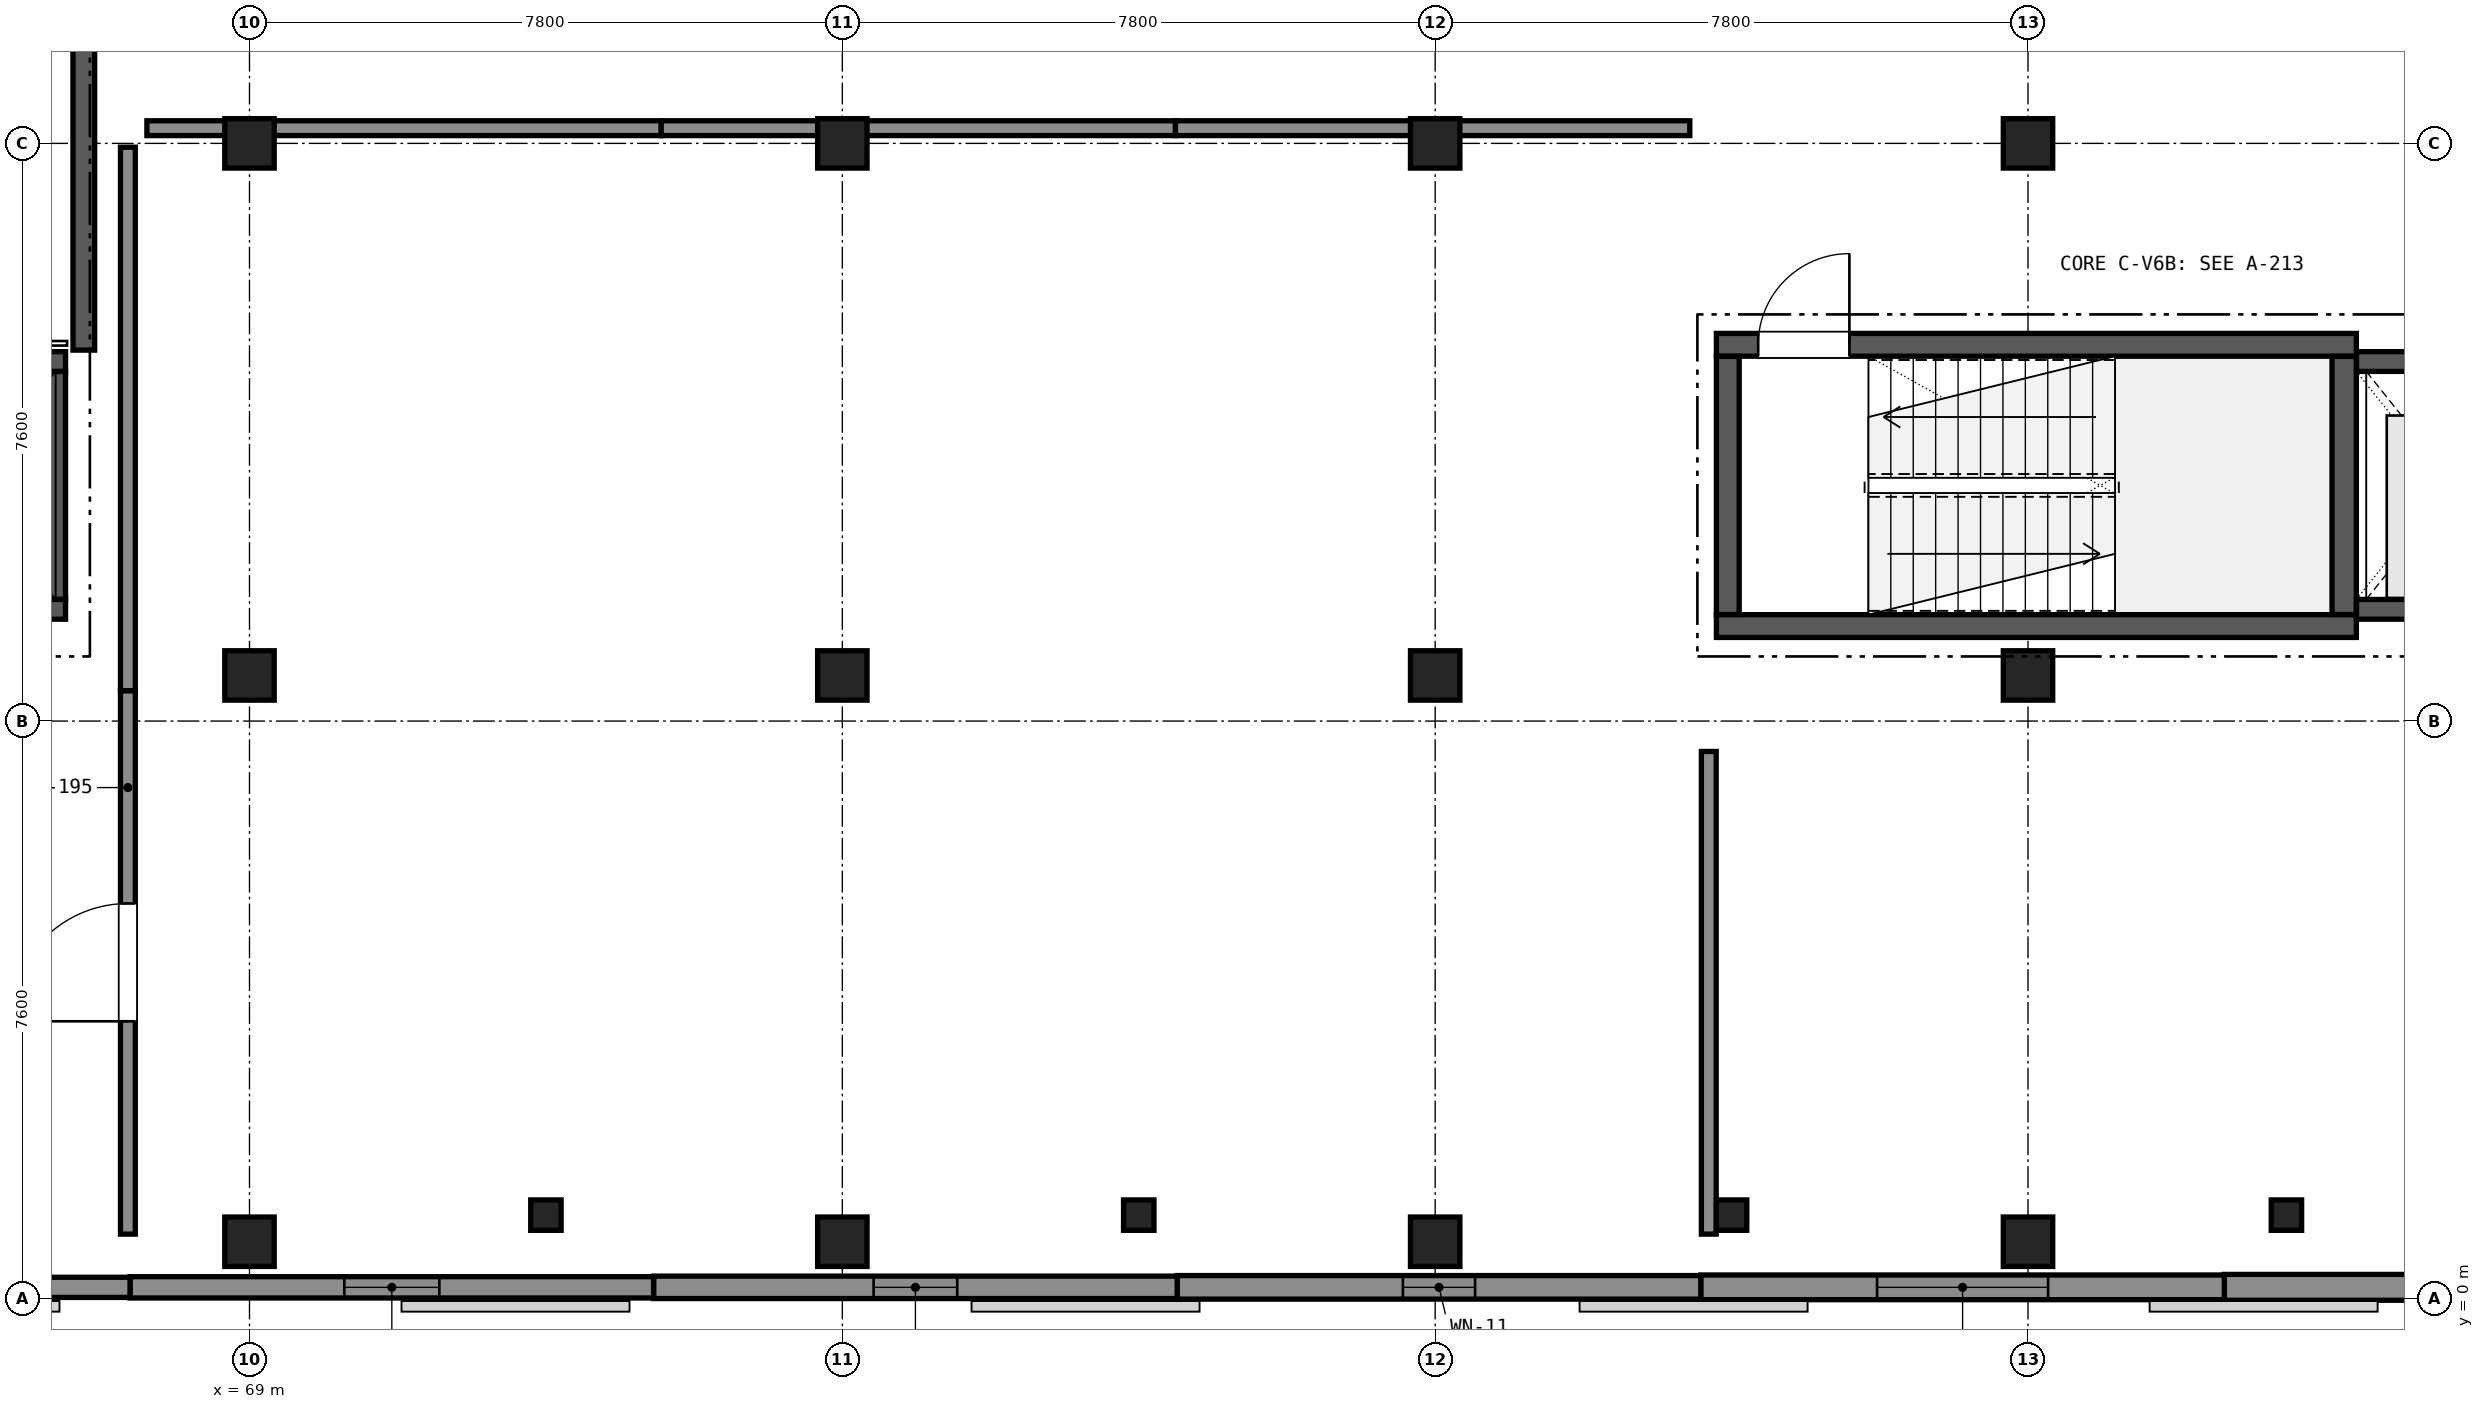
"""IFC4 building model, lengths in metres.
Left out: names, types, materials, properties, quantities, classifications, styles, units other than length and angle.
Written with IfcOpenShell. Run it as: python <this file> out.ifc"""

import sys

from ifc_helpers import new_model, si_unit, direction, frame, frame_2d, origin, origin_2d, place, context, subcontext, project, spatial, rectangle, extrude, element, fill, save


model = new_model("IFC4")
c1 = context("Model", 3, precision=1e-05, world=origin(), true_north=direction((0.0, 1.0)))
c2 = subcontext(c1, "Body", "Model", "MODEL_VIEW")
j1 = project(units=[si_unit("LENGTHUNIT", "METRE"), si_unit("PLANEANGLEUNIT", "RADIAN")], contexts=[c1])
p1 = place(None, origin())
s1 = spatial("IfcSite", under=j1, at=p1, CompositionType="ELEMENT")
p2 = place(p1, origin())
s2 = spatial("IfcBuilding", under=s1, at=p2, CompositionType="ELEMENT")
p3 = place(p2, frame((0.0, 0.0, 9.52)))
s3 = spatial("IfcBuildingStorey", under=s2, at=p3, CompositionType="ELEMENT", Elevation=9.52)
for number, where, z_axis, x_axis in (
    (1, (69.0, 0.75, 0.0), (0.0, 0.0, 1.0), (1.0, 0.0, 0.0)),
    (2, (69.0, 8.2, 0.0), (0.0, 0.0, 1.0), (1.0, 0.0, 0.0)),
    (3, (69.0, 15.2, 0.0), (0.0, 0.0, 1.0), (1.0, 0.0, 0.0)),
    (4, (76.8, 0.75, 0.0), (0.0, 0.0, 1.0), (1.0, 0.0, 0.0)),
    (5, (76.8, 8.2, 0.0), (0.0, 0.0, 1.0), (1.0, 0.0, 0.0)),
    (6, (76.8, 15.2, 0.0), (0.0, 0.0, 1.0), (1.0, 0.0, 0.0)),
    (7, (84.6, 0.75, 0.0), (0.0, 0.0, 1.0), (1.0, 0.0, 0.0)),
    (8, (84.6, 8.2, 0.0), (0.0, 0.0, 1.0), (1.0, 0.0, 0.0)),
    (9, (84.6, 15.2, 0.0), (0.0, 0.0, 1.0), (1.0, 0.0, 0.0)),
    (10, (92.4, 0.75, 0.0), (0.0, 0.0, 1.0), (1.0, 0.0, 0.0)),
    (11, (92.4, 8.2, 0.0), (0.0, 0.0, 1.0), (1.0, 0.0, 0.0)),
    (12, (92.4, 15.2, 0.0), (0.0, 0.0, 1.0), (1.0, 0.0, 0.0)),
):
    element("IfcColumn", number, at=place(p3, frame(where, z_axis=z_axis, x_axis=x_axis)), inside=s3, PredefinedType="COLUMN", context=c2, shape_type="SweptSolid", body=[
        extrude(rectangle(XDim=0.65, YDim=0.65, at=origin_2d()), origin(), (0.0, 0.0, 1.0), 4.08),
    ])
for number, where, z_axis, x_axis in (
    (13, (72.9, 1.1, 0.0), (0.0, 0.0, 1.0), (1.0, 0.0, 0.0)),
    (14, (80.7, 1.1, 0.0), (0.0, 0.0, 1.0), (1.0, 0.0, 0.0)),
    (15, (88.5, 1.1, 0.0), (0.0, 0.0, 1.0), (1.0, 0.0, 0.0)),
    (16, (95.8, 1.1, 0.0), (0.0, 0.0, 1.0), (1.0, 0.0, 0.0)),
):
    element("IfcColumn", number, at=place(p3, frame(where, z_axis=z_axis, x_axis=x_axis)), inside=s3, PredefinedType="PILASTER", context=c2, shape_type="SweptSolid", body=[
        extrude(rectangle(XDim=0.4, YDim=0.4, at=origin_2d()), origin(), (0.0, 0.0, 1.0), 4.08),
    ])
p4 = place(p3, frame((101.872, 0.15, 0.0), z_axis=(0.0, 0.0, 1.0), x_axis=(-1.0, 0.0, 0.0)))
e17 = element("IfcWall", 17, at=p4, inside=s3, PredefinedType="SOLIDWALL", context=c2, shape_type="SweptSolid", body=[
    extrude(rectangle(XDim=6.889, YDim=0.34, at=frame_2d((3.444, 0.0))), origin(), (0.0, 0.0, 1.0), 3.78),
])
p5 = place(p4, frame((2.394, 0.0, 0.9)))
e18 = element("IfcOpeningElement", 18, at=p5, cuts=e17, PredefinedType="OPENING", context=c2, shape_type="SweptSolid", body=[
    extrude(rectangle(XDim=2.1, YDim=1.5, at=frame_2d((1.05, 0.75))), frame((0.0, 0.18, 0.0), z_axis=(0.0, -1.0, 0.0), x_axis=(1.0, 0.0, 0.0)), (0.0, 0.0, 1.0), 0.36),
])
p6 = place(p3, frame((94.983, 0.15, 0.0), z_axis=(0.0, 0.0, 1.0), x_axis=(-1.0, 0.0, 0.0)))
e19 = element("IfcWall", 19, at=p6, inside=s3, PredefinedType="SOLIDWALL", context=c2, shape_type="SweptSolid", body=[
    extrude(rectangle(XDim=6.889, YDim=0.325, at=frame_2d((3.444, 0.0))), origin(), (0.0, 0.0, 1.0), 3.78),
])
p7 = place(p6, frame((2.319, 0.0, 0.9)))
e20 = element("IfcOpeningElement", 20, at=p7, cuts=e19, PredefinedType="OPENING", context=c2, shape_type="SweptSolid", body=[
    extrude(rectangle(XDim=2.25, YDim=1.5, at=frame_2d((1.125, 0.75))), frame((0.0, 0.172, 0.0), z_axis=(0.0, -1.0, 0.0), x_axis=(1.0, 0.0, 0.0)), (0.0, 0.0, 1.0), 0.345),
])
p8 = place(p3, frame((88.094, 0.15, 0.0), z_axis=(0.0, 0.0, 1.0), x_axis=(-1.0, 0.0, 0.0)))
e21 = element("IfcWall", 21, at=p8, inside=s3, PredefinedType="SOLIDWALL", context=c2, shape_type="SweptSolid", body=[
    extrude(rectangle(XDim=6.889, YDim=0.31, at=frame_2d((3.444, 0.0))), origin(), (0.0, 0.0, 1.0), 3.78),
])
p9 = place(p8, frame((2.969, 0.0, 0.9)))
e22 = element("IfcOpeningElement", 22, at=p9, cuts=e21, PredefinedType="OPENING", context=c2, shape_type="SweptSolid", body=[
    extrude(rectangle(XDim=0.95, YDim=1.75, at=frame_2d((0.475, 0.875))), frame((0.0, 0.165, 0.0), z_axis=(0.0, -1.0, 0.0), x_axis=(1.0, 0.0, 0.0)), (0.0, 0.0, 1.0), 0.33),
])
p10 = place(p3, frame((81.206, 0.15, 0.0), z_axis=(0.0, 0.0, 1.0), x_axis=(-1.0, 0.0, 0.0)))
e23 = element("IfcWall", 23, at=p10, inside=s3, PredefinedType="SOLIDWALL", context=c2, shape_type="SweptSolid", body=[
    extrude(rectangle(XDim=6.889, YDim=0.295, at=frame_2d((3.444, 0.0))), origin(), (0.0, 0.0, 1.0), 3.78),
])
p11 = place(p10, frame((2.894, 0.0, 0.9)))
e24 = element("IfcOpeningElement", 24, at=p11, cuts=e23, PredefinedType="OPENING", context=c2, shape_type="SweptSolid", body=[
    extrude(rectangle(XDim=1.1, YDim=1.75, at=frame_2d((0.55, 0.875))), frame((0.0, 0.157, 0.0), z_axis=(0.0, -1.0, 0.0), x_axis=(1.0, 0.0, 0.0)), (0.0, 0.0, 1.0), 0.315),
])
p12 = place(p3, frame((74.317, 0.15, 0.0), z_axis=(0.0, 0.0, 1.0), x_axis=(-1.0, 0.0, 0.0)))
e25 = element("IfcWall", 25, at=p12, inside=s3, PredefinedType="SOLIDWALL", context=c2, shape_type="SweptSolid", body=[
    extrude(rectangle(XDim=6.889, YDim=0.28, at=frame_2d((3.444, 0.0))), origin(), (0.0, 0.0, 1.0), 3.78),
])
p13 = place(p12, frame((2.819, 0.0, 0.9)))
e26 = element("IfcOpeningElement", 26, at=p13, cuts=e25, PredefinedType="OPENING", context=c2, shape_type="SweptSolid", body=[
    extrude(rectangle(XDim=1.25, YDim=1.75, at=frame_2d((0.625, 0.875))), frame((0.0, 0.15, 0.0), z_axis=(0.0, -1.0, 0.0), x_axis=(1.0, 0.0, 0.0)), (0.0, 0.0, 1.0), 0.3),
])
p14 = place(p3, frame((67.428, 0.15, 0.0), z_axis=(0.0, 0.0, 1.0), x_axis=(-1.0, 0.0, 0.0)))
e27 = element("IfcWall", 27, at=p14, inside=s3, PredefinedType="SOLIDWALL", context=c2, shape_type="SweptSolid", body=[
    extrude(rectangle(XDim=6.889, YDim=0.265, at=frame_2d((3.444, 0.0))), origin(), (0.0, 0.0, 1.0), 3.78),
])
p15 = place(p14, frame((2.744, 0.0, 0.9)))
e28 = element("IfcOpeningElement", 28, at=p15, cuts=e27, PredefinedType="OPENING", context=c2, shape_type="SweptSolid", body=[
    extrude(rectangle(XDim=1.4, YDim=1.75, at=frame_2d((0.7, 0.875))), frame((0.0, 0.142, 0.0), z_axis=(0.0, -1.0, 0.0), x_axis=(1.0, 0.0, 0.0)), (0.0, 0.0, 1.0), 0.285),
])
p16 = place(p3, frame((63.922, 9.07, 0.0), z_axis=(0.0, 0.0, 1.0), x_axis=(1.0, 0.0, 0.0)))
e29 = element("IfcWall", 29, at=p16, inside=s3, PredefinedType="SHEAR", context=c2, shape_type="SweptSolid", body=[
    extrude(rectangle(XDim=2.658, YDim=0.26, at=frame_2d((1.329, 0.0))), origin(), (0.0, 0.0, 1.0), 3.78),
])
p17 = place(p3, frame((63.922, 12.33, 0.0), z_axis=(0.0, 0.0, 1.0), x_axis=(1.0, 0.0, 0.0)))
e30 = element("IfcWall", 30, at=p17, inside=s3, PredefinedType="SHEAR", context=c2, shape_type="SweptSolid", body=[
    extrude(rectangle(XDim=2.658, YDim=0.26, at=frame_2d((1.329, 0.0))), origin(), (0.0, 0.0, 1.0), 3.78),
])
p18 = place(p17, frame((0.619, 0.0, 0.0)))
e31 = element("IfcOpeningElement", 31, at=p18, cuts=e30, PredefinedType="OPENING", context=c2, shape_type="SweptSolid", body=[
    extrude(rectangle(XDim=1.42, YDim=2.25, at=frame_2d((0.71, 1.125))), frame((0.0, 0.14, 0.0), z_axis=(0.0, -1.0, 0.0), x_axis=(1.0, 0.0, 0.0)), (0.0, 0.0, 1.0), 0.28),
])
p19 = place(p3, frame((66.45, 9.202, 0.0), z_axis=(0.0, 0.0, 1.0), x_axis=(0.0, 1.0, 0.0)))
e32 = element("IfcWall", 32, at=p19, inside=s3, PredefinedType="SHEAR", context=c2, shape_type="SweptSolid", body=[
    extrude(rectangle(XDim=2.996, YDim=0.26, at=frame_2d((1.498, 0.0))), origin(), (0.0, 0.0, 1.0), 3.78),
])
p20 = place(p3, frame((66.82, 12.48, 0.0), z_axis=(0.0, 0.0, 1.0), x_axis=(0.0, 1.0, 0.0)))
e33 = element("IfcWall", 33, at=p20, inside=s3, PredefinedType="SHEAR", context=c2, shape_type="SweptSolid", body=[
    extrude(rectangle(XDim=4.03, YDim=0.285, at=frame_2d((2.015, 0.0))), origin(), (0.0, 0.0, 1.0), 3.03),
])
p21 = place(p3, frame((88.3, 8.85, 0.0), z_axis=(0.0, 0.0, 1.0), x_axis=(1.0, 0.0, 0.0)))
e34 = element("IfcWall", 34, at=p21, inside=s3, PredefinedType="SHEAR", context=c2, shape_type="SweptSolid", body=[
    extrude(rectangle(XDim=8.42, YDim=0.3, at=frame_2d((4.21, 0.0))), origin(), (0.0, 0.0, 1.0), 3.78),
])
p22 = place(p3, frame((88.3, 12.55, 0.0), z_axis=(0.0, 0.0, 1.0), x_axis=(1.0, 0.0, 0.0)))
e35 = element("IfcWall", 35, at=p22, inside=s3, PredefinedType="SHEAR", context=c2, shape_type="SweptSolid", body=[
    extrude(rectangle(XDim=8.42, YDim=0.3, at=frame_2d((4.21, 0.0))), origin(), (0.0, 0.0, 1.0), 3.78),
])
p23 = place(p22, frame((0.55, 0.0, 0.0)))
e36 = element("IfcOpeningElement", 36, at=p23, cuts=e35, PredefinedType="OPENING", context=c2, shape_type="SweptSolid", body=[
    extrude(rectangle(XDim=1.2, YDim=2.2, at=frame_2d((0.6, 1.1))), frame((0.0, 0.16, 0.0), z_axis=(0.0, -1.0, 0.0), x_axis=(1.0, 0.0, 0.0)), (0.0, 0.0, 1.0), 0.32),
])
p24 = place(p3, frame((88.45, 9.002, 0.0), z_axis=(0.0, 0.0, 1.0), x_axis=(0.0, 1.0, 0.0)))
e37 = element("IfcWall", 37, at=p24, inside=s3, PredefinedType="SHEAR", context=c2, shape_type="SweptSolid", body=[
    extrude(rectangle(XDim=3.396, YDim=0.3, at=frame_2d((1.698, 0.0))), origin(), (0.0, 0.0, 1.0), 3.78),
])
p25 = place(p3, frame((96.56, 9.002, 0.0), z_axis=(0.0, 0.0, 1.0), x_axis=(0.0, 1.0, 0.0)))
e38 = element("IfcWall", 38, at=p25, inside=s3, PredefinedType="SHEAR", context=c2, shape_type="SweptSolid", body=[
    extrude(rectangle(XDim=3.396, YDim=0.32, at=frame_2d((1.698, 0.0))), origin(), (0.0, 0.0, 1.0), 3.78),
])
p26 = place(p3, frame((96.722, 9.07, 0.0), z_axis=(0.0, 0.0, 1.0), x_axis=(1.0, 0.0, 0.0)))
e39 = element("IfcWall", 39, at=p26, inside=s3, PredefinedType="SHEAR", context=c2, shape_type="SweptSolid", body=[
    extrude(rectangle(XDim=2.658, YDim=0.26, at=frame_2d((1.329, 0.0))), origin(), (0.0, 0.0, 1.0), 3.78),
])
p27 = place(p3, frame((96.722, 12.33, 0.0), z_axis=(0.0, 0.0, 1.0), x_axis=(1.0, 0.0, 0.0)))
e40 = element("IfcWall", 40, at=p27, inside=s3, PredefinedType="SHEAR", context=c2, shape_type="SweptSolid", body=[
    extrude(rectangle(XDim=2.658, YDim=0.26, at=frame_2d((1.329, 0.0))), origin(), (0.0, 0.0, 1.0), 3.78),
])
p28 = place(p27, frame((0.679, 0.0, 0.0)))
e41 = element("IfcOpeningElement", 41, at=p28, cuts=e40, PredefinedType="OPENING", context=c2, shape_type="SweptSolid", body=[
    extrude(rectangle(XDim=1.3, YDim=2.2, at=frame_2d((0.65, 1.1))), frame((0.0, 0.14, 0.0), z_axis=(0.0, -1.0, 0.0), x_axis=(1.0, 0.0, 0.0)), (0.0, 0.0, 1.0), 0.28),
])
p29 = place(p3, frame((67.4, 0.85, 0.0), z_axis=(0.0, 0.0, 1.0), x_axis=(0.0, 1.0, 0.0)))
e42 = element("IfcWall", 42, at=p29, inside=s3, PredefinedType="PARTITIONING", context=c2, shape_type="SweptSolid", body=[
    extrude(rectangle(XDim=7.15, YDim=0.195, at=frame_2d((3.575, 0.0))), origin(), (0.0, 0.0, 1.0), 3.0),
])
p30 = place(p29, frame((2.8, 0.0, 0.0)))
e43 = element("IfcOpeningElement", 43, at=p30, cuts=e42, PredefinedType="OPENING", context=c2, shape_type="SweptSolid", body=[
    extrude(rectangle(XDim=1.55, YDim=2.25, at=frame_2d((0.775, 1.125))), frame((0.0, 0.107, 0.0), z_axis=(0.0, -1.0, 0.0), x_axis=(1.0, 0.0, 0.0)), (0.0, 0.0, 1.0), 0.215),
])
p31 = place(p3, frame((67.4, 8.0, 0.0), z_axis=(0.0, 0.0, 1.0), x_axis=(0.0, 1.0, 0.0)))
e44 = element("IfcWall", 44, at=p31, inside=s3, PredefinedType="PARTITIONING", context=c2, shape_type="SweptSolid", body=[
    extrude(rectangle(XDim=7.15, YDim=0.195, at=frame_2d((3.575, 0.0))), origin(), (0.0, 0.0, 1.0), 3.03),
])
p32 = place(p3, frame((67.65, 15.4, 0.0), z_axis=(0.0, 0.0, 1.0), x_axis=(1.0, 0.0, 0.0)))
e45 = element("IfcWall", 45, at=p32, inside=s3, PredefinedType="PARTITIONING", context=c2, shape_type="SweptSolid", body=[
    extrude(rectangle(XDim=6.767, YDim=0.195, at=frame_2d((3.384, 0.0))), origin(), (0.0, 0.0, 1.0), 2.98),
])
p33 = place(p3, frame((74.417, 15.4, 0.0), z_axis=(0.0, 0.0, 1.0), x_axis=(1.0, 0.0, 0.0)))
e46 = element("IfcWall", 46, at=p33, inside=s3, PredefinedType="PARTITIONING", context=c2, shape_type="SweptSolid", body=[
    extrude(rectangle(XDim=6.766, YDim=0.195, at=frame_2d((3.383, 0.0))), origin(), (0.0, 0.0, 1.0), 2.98),
])
p34 = place(p3, frame((81.183, 15.4, 0.0), z_axis=(0.0, 0.0, 1.0), x_axis=(1.0, 0.0, 0.0)))
e47 = element("IfcWall", 47, at=p34, inside=s3, PredefinedType="PARTITIONING", context=c2, shape_type="SweptSolid", body=[
    extrude(rectangle(XDim=6.767, YDim=0.195, at=frame_2d((3.383, 0.0))), origin(), (0.0, 0.0, 1.0), 3.03),
])
p35 = place(p3, frame((88.2, 7.2, 0.0), z_axis=(0.0, 0.0, 1.0), x_axis=(0.0, -1.0, 0.0)))
e48 = element("IfcWall", 48, at=p35, inside=s3, PredefinedType="PARTITIONING", context=c2, shape_type="SweptSolid", body=[
    extrude(rectangle(XDim=6.35, YDim=0.195, at=frame_2d((3.175, 0.0))), origin(), (0.0, 0.0, 1.0), 3.18),
])
p36 = place(p7, origin())
e49 = element("IfcWindow", 49, at=p36, inside=s3, PartitioningType="SINGLE_PANEL", PredefinedType="WINDOW", context=c2, shape_type="SweptSolid", body=[
    extrude(rectangle(XDim=2.25, YDim=1.5, at=frame_2d((1.125, 0.75))), frame((0.0, 0.03, 0.0), z_axis=(0.0, -1.0, 0.0), x_axis=(1.0, 0.0, 0.0)), (0.0, 0.0, 1.0), 0.06),
])
fill(e20, e49)
p37 = place(p9, origin())
e50 = element("IfcWindow", 50, at=p37, inside=s3, PartitioningType="SINGLE_PANEL", PredefinedType="WINDOW", context=c2, shape_type="SweptSolid", body=[
    extrude(rectangle(XDim=0.95, YDim=1.75, at=frame_2d((0.475, 0.875))), frame((0.0, 0.03, 0.0), z_axis=(0.0, -1.0, 0.0), x_axis=(1.0, 0.0, 0.0)), (0.0, 0.0, 1.0), 0.06),
])
fill(e22, e50)
p38 = place(p11, origin())
e51 = element("IfcWindow", 51, at=p38, inside=s3, PartitioningType="SINGLE_PANEL", PredefinedType="WINDOW", context=c2, shape_type="SweptSolid", body=[
    extrude(rectangle(XDim=1.1, YDim=1.75, at=frame_2d((0.55, 0.875))), frame((0.0, 0.03, 0.0), z_axis=(0.0, -1.0, 0.0), x_axis=(1.0, 0.0, 0.0)), (0.0, 0.0, 1.0), 0.06),
])
fill(e24, e51)
p39 = place(p13, origin())
e52 = element("IfcWindow", 52, at=p39, inside=s3, PartitioningType="SINGLE_PANEL", PredefinedType="WINDOW", context=c2, shape_type="SweptSolid", body=[
    extrude(rectangle(XDim=1.25, YDim=1.75, at=frame_2d((0.625, 0.875))), frame((0.0, 0.03, 0.0), z_axis=(0.0, -1.0, 0.0), x_axis=(1.0, 0.0, 0.0)), (0.0, 0.0, 1.0), 0.06),
])
fill(e26, e52)
p40 = place(p23, origin())
e53 = element("IfcDoor", 53, at=p40, inside=s3, OperationType="SINGLE_SWING_RIGHT", PredefinedType="DOOR", context=c2, shape_type="SweptSolid", body=[
    extrude(rectangle(XDim=1.2, YDim=2.2, at=frame_2d((0.6, 1.1))), frame((0.0, 0.025, 0.0), z_axis=(0.0, -1.0, 0.0), x_axis=(1.0, 0.0, 0.0)), (0.0, 0.0, 1.0), 0.05),
])
fill(e36, e53)
p41 = place(p30, origin())
e54 = element("IfcDoor", 54, at=p41, inside=s3, OperationType="SINGLE_SWING_LEFT", PredefinedType="DOOR", context=c2, shape_type="SweptSolid", body=[
    extrude(rectangle(XDim=1.55, YDim=2.25, at=frame_2d((0.775, 1.125))), frame((0.0, 0.025, 0.0), z_axis=(0.0, -1.0, 0.0), x_axis=(1.0, 0.0, 0.0)), (0.0, 0.0, 1.0), 0.05),
])
fill(e43, e54)
save(model, sys.argv[1])
